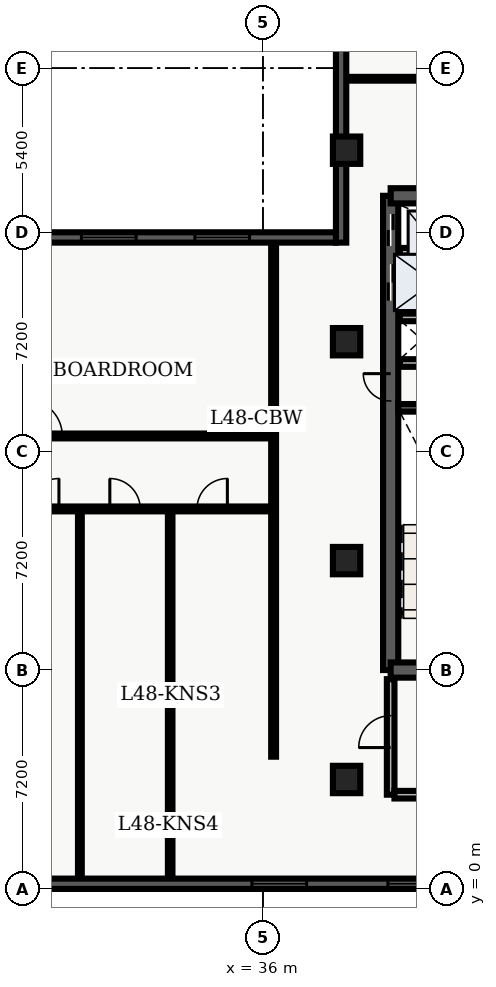
"""IFC4 building model, lengths in metres.
Left out: names, types, materials, properties, quantities, classifications, styles, units other than length and angle.
Written with IfcOpenShell. Run it as: python <this file> out.ifc"""

import sys

from ifc_helpers import new_model, entity, si_unit, converted_unit, direction, frame, origin_with_axes, origin_2d_with_axis, place, context, subcontext, project, spatial, polyline, rectangle, outline, extrude, element, fill, save


model = new_model("IFC4")
c1 = context("Model", 3, precision=1e-05, world=origin_with_axes(), true_north=direction((0.0, 1.0)))
c2 = subcontext(c1, "Body", "Model", "MODEL_VIEW")
j1 = project(units=[si_unit("LENGTHUNIT", "METRE"), converted_unit("PLANEANGLEUNIT", "DEGREE", entity("IfcPlaneAngleMeasure", 0.017), si_unit("PLANEANGLEUNIT", "RADIAN"), dimensions=[0, 0, 0, 0, 0, 0, 0])], contexts=[c1])
p1 = place(None, origin_with_axes())
s1 = spatial("IfcSite", under=j1, at=p1, CompositionType="ELEMENT")
p2 = place(p1, origin_with_axes())
s2 = spatial("IfcBuilding", under=s1, at=p2, CompositionType="ELEMENT")
p3 = place(p2, frame((0.0, 0.0, 196.5), z_axis=(0.0, 0.0, 1.0), x_axis=(1.0, 0.0, 0.0)))
s3 = spatial("IfcBuildingStorey", under=s2, at=p3, CompositionType="ELEMENT", Elevation=196.5)
p4 = place(p3, frame((40.2, 7.2, 0.0), z_axis=(0.0, 0.0, 1.0), x_axis=(0.0, 1.0, 0.0)))
e1 = element("IfcWall", 1, at=p4, inside=s3, PredefinedType="SHEAR", context=c2, shape_type="SweptSolid", body=[
    extrude(outline(polyline([(0.0, -0.25), (15.6, -0.25), (15.6, 0.25), (0.0, 0.25), (0.0, -0.25)])), origin_with_axes(), (0.0, 0.0, 1.0), 3.66),
])
p5 = place(p4, frame((14.475, 0.0, 0.0), z_axis=(0.0, 0.0, 1.0), x_axis=(1.0, 0.0, 0.0)))
e2 = element("IfcOpeningElement", 2, at=p5, cuts=e1, PredefinedType="OPENING", context=c2, shape_type="SweptSolid", body=[
    extrude(rectangle(XDim=1.05, YDim=0.52, at=origin_2d_with_axis()), origin_with_axes(), (0.0, 0.0, 1.0), 2.15),
])
p6 = place(p4, frame((12.75, 0.0, 0.0), z_axis=(0.0, 0.0, 1.0), x_axis=(1.0, 0.0, 0.0)))
e3 = element("IfcOpeningElement", 3, at=p6, cuts=e1, PredefinedType="OPENING", context=c2, shape_type="SweptSolid", body=[
    extrude(rectangle(XDim=1.2, YDim=0.52, at=origin_2d_with_axis()), origin_with_axes(), (0.0, 0.0, 1.0), 2.15),
])
p7 = place(p4, frame((9.3, 0.0, 0.0), z_axis=(0.0, 0.0, 1.0), x_axis=(1.0, 0.0, 0.0)))
e4 = element("IfcOpeningElement", 4, at=p7, cuts=e1, PredefinedType="OPENING", context=c2, shape_type="SweptSolid", body=[
    extrude(rectangle(XDim=0.9, YDim=0.52, at=origin_2d_with_axis()), origin_with_axes(), (0.0, 0.0, 1.0), 2.15),
])
p8 = place(p3, frame((40.2, 7.2, 0.0), z_axis=(0.0, 0.0, 1.0), x_axis=(1.0, 0.0, 0.0)))
e5 = element("IfcWall", 5, at=p8, inside=s3, PredefinedType="SHEAR", context=c2, shape_type="SweptSolid", body=[
    extrude(outline(polyline([(0.0, -0.25), (7.85, -0.25), (7.85, 0.25), (0.0, 0.25), (0.0, -0.25)])), origin_with_axes(), (0.0, 0.0, 1.0), 3.66),
])
p9 = place(p8, frame((2.175, 0.0, 0.0), z_axis=(0.0, 0.0, 1.0), x_axis=(1.0, 0.0, 0.0)))
e6 = element("IfcOpeningElement", 6, at=p9, cuts=e5, PredefinedType="OPENING", context=c2, shape_type="SweptSolid", body=[
    extrude(rectangle(XDim=1.05, YDim=0.52, at=origin_2d_with_axis()), origin_with_axes(), (0.0, 0.0, 1.0), 2.15),
])
p10 = place(p3, frame((40.2, 22.8, 0.0), z_axis=(0.0, 0.0, 1.0), x_axis=(1.0, 0.0, 0.0)))
e7 = element("IfcWall", 7, at=p10, inside=s3, PredefinedType="SHEAR", context=c2, shape_type="SweptSolid", body=[
    extrude(outline(polyline([(0.0, -0.25), (7.85, -0.25), (7.85, 0.25), (0.0, 0.25), (0.0, -0.25)])), origin_with_axes(), (0.0, 0.0, 1.0), 3.66),
])
p11 = place(p10, frame((5.775, 0.0, 0.0), z_axis=(0.0, 0.0, 1.0), x_axis=(1.0, 0.0, 0.0)))
e8 = element("IfcOpeningElement", 8, at=p11, cuts=e7, PredefinedType="OPENING", context=c2, shape_type="SweptSolid", body=[
    extrude(rectangle(XDim=1.05, YDim=0.52, at=origin_2d_with_axis()), origin_with_axes(), (0.0, 0.0, 1.0), 2.15),
])
p12 = place(p3, frame((40.45, 15.825, 0.0), z_axis=(0.0, 0.0, 1.0), x_axis=(1.0, 0.0, 0.0)))
e9 = element("IfcWall", 9, at=p12, inside=s3, PredefinedType="SHEAR", context=c2, shape_type="SweptSolid", body=[
    extrude(outline(polyline([(0.0, -0.125), (3.55, -0.125), (3.55, 0.125), (0.0, 0.125), (0.0, -0.125)])), origin_with_axes(), (0.0, 0.0, 1.0), 3.66),
])
p13 = place(p3, frame((40.5, 17.3, 0.0), z_axis=(0.0, 0.0, 1.0), x_axis=(1.0, 0.0, 0.0)))
e10 = element("IfcWall", 10, at=p13, inside=s3, PredefinedType="SOLIDWALL", context=c2, shape_type="SweptSolid", body=[
    extrude(outline(polyline([(0.0, -0.125), (3.5, -0.125), (3.5, 0.125), (0.0, 0.125), (0.0, -0.125)])), origin_with_axes(), (0.0, 0.0, 1.0), 2.7),
])
p14 = place(p13, frame((2.4, 0.0, 0.0), z_axis=(0.0, 0.0, 1.0), x_axis=(1.0, 0.0, 0.0)))
e11 = element("IfcOpeningElement", 11, at=p14, cuts=e10, PredefinedType="OPENING", context=c2, shape_type="SweptSolid", body=[
    extrude(rectangle(XDim=0.9, YDim=0.27, at=origin_2d_with_axis()), origin_with_axes(), (0.0, 0.0, 1.0), 2.15),
])
p15 = place(p3, frame((40.5, 18.8, 0.0), z_axis=(0.0, 0.0, 1.0), x_axis=(1.0, 0.0, 0.0)))
e12 = element("IfcWall", 12, at=p15, inside=s3, PredefinedType="SOLIDWALL", context=c2, shape_type="SweptSolid", body=[
    extrude(outline(polyline([(0.0, -0.125), (3.5, -0.125), (3.5, 0.125), (0.0, 0.125), (0.0, -0.125)])), origin_with_axes(), (0.0, 0.0, 1.0), 2.7),
])
p16 = place(p3, frame((40.2, 3.1, 0.0), z_axis=(0.0, 0.0, 1.0), x_axis=(0.0, 1.0, 0.0)))
e13 = element("IfcWall", 13, at=p16, inside=s3, PredefinedType="SOLIDWALL", context=c2, shape_type="SweptSolid", body=[
    extrude(outline(polyline([(0.0, -0.125), (3.8, -0.125), (3.8, 0.125), (0.0, 0.125), (0.0, -0.125)])), origin_with_axes(), (0.0, 0.0, 1.0), 2.7),
])
p17 = place(p16, frame((2.075, 0.0, 0.0), z_axis=(0.0, 0.0, 1.0), x_axis=(1.0, 0.0, 0.0)))
e14 = element("IfcOpeningElement", 14, at=p17, cuts=e13, PredefinedType="OPENING", context=c2, shape_type="SweptSolid", body=[
    extrude(rectangle(XDim=1.05, YDim=0.27, at=origin_2d_with_axis()), origin_with_axes(), (0.0, 0.0, 1.0), 2.15),
])
p18 = place(p3, frame((40.325, 3.1, 0.0), z_axis=(0.0, 0.0, 1.0), x_axis=(1.0, 0.0, 0.0)))
e15 = element("IfcWall", 15, at=p18, inside=s3, PredefinedType="SOLIDWALL", context=c2, shape_type="SweptSolid", body=[
    extrude(outline(polyline([(0.0, -0.125), (3.95, -0.125), (3.95, 0.125), (0.0, 0.125), (0.0, -0.125)])), origin_with_axes(), (0.0, 0.0, 1.0), 2.7),
])
for number, where, z_axis, x_axis in (
    (16, (38.75, 3.6, 0.0), (0.0, 0.0, 1.0), (1.0, 0.0, 0.0)),
    (17, (38.75, 10.8, 0.0), (0.0, 0.0, 1.0), (1.0, 0.0, 0.0)),
    (18, (38.75, 18.0, 0.0), (0.0, 0.0, 1.0), (1.0, 0.0, 0.0)),
    (19, (38.75, 24.3, 0.0), (0.0, 0.0, 1.0), (1.0, 0.0, 0.0)),
):
    element("IfcColumn", number, at=place(p3, frame(where, z_axis=z_axis, x_axis=x_axis)), inside=s3, PredefinedType="COLUMN", context=c2, shape_type="SweptSolid", body=[
        extrude(rectangle(XDim=0.9, YDim=0.9, at=origin_2d_with_axis()), origin_with_axes(), (0.0, 0.0, 1.0), 3.9),
    ])
p19 = place(p3, frame((40.5, 20.96, 0.0), z_axis=(0.0, 0.0, 1.0), x_axis=(1.0, 0.0, 0.0)))
e20 = element("IfcWall", 20, at=p19, inside=s3, PredefinedType="SOLIDWALL", context=c2, shape_type="SweptSolid", body=[
    extrude(outline(polyline([(0.0, -0.125), (3.5, -0.125), (3.5, 0.125), (0.0, 0.125), (0.0, -0.125)])), origin_with_axes(), (0.0, 0.0, 1.0), 2.7),
])
p20 = place(p3, frame((21.15, 12.5, 0.0), z_axis=(0.0, 0.0, 1.0), x_axis=(1.0, 0.0, 0.0)))
e21 = element("IfcWall", 21, at=p20, inside=s3, PredefinedType="PARTITIONING", context=c2, shape_type="SweptSolid", body=[
    extrude(outline(polyline([(0.0, -0.08), (15.2, -0.08), (15.2, 0.08), (0.0, 0.08), (0.0, -0.08)])), origin_with_axes(), (0.0, 0.0, 1.0), 2.7),
])
p21 = place(p20, frame((3.315, 0.0, 0.0), z_axis=(0.0, 0.0, 1.0), x_axis=(1.0, 0.0, 0.0)))
e22 = element("IfcOpeningElement", 22, at=p21, cuts=e21, PredefinedType="OPENING", context=c2, shape_type="SweptSolid", body=[
    extrude(rectangle(XDim=1.0, YDim=0.18, at=origin_2d_with_axis()), origin_with_axes(), (0.0, 0.0, 1.0), 2.15),
])
p22 = place(p20, frame((7.639, 0.0, 0.0), z_axis=(0.0, 0.0, 1.0), x_axis=(1.0, 0.0, 0.0)))
e23 = element("IfcOpeningElement", 23, at=p22, cuts=e21, PredefinedType="OPENING", context=c2, shape_type="SweptSolid", body=[
    extrude(rectangle(XDim=1.0, YDim=0.18, at=origin_2d_with_axis()), origin_with_axes(), (0.0, 0.0, 1.0), 2.15),
])
p23 = place(p20, frame((10.313, 0.0, 0.0), z_axis=(0.0, 0.0, 1.0), x_axis=(1.0, 0.0, 0.0)))
e24 = element("IfcOpeningElement", 24, at=p23, cuts=e21, PredefinedType="OPENING", context=c2, shape_type="SweptSolid", body=[
    extrude(rectangle(XDim=1.0, YDim=0.18, at=origin_2d_with_axis()), origin_with_axes(), (0.0, 0.0, 1.0), 2.15),
])
p24 = place(p20, frame((13.179, 0.0, 0.0), z_axis=(0.0, 0.0, 1.0), x_axis=(1.0, 0.0, 0.0)))
e25 = element("IfcOpeningElement", 25, at=p24, cuts=e21, PredefinedType="OPENING", context=c2, shape_type="SweptSolid", body=[
    extrude(rectangle(XDim=1.0, YDim=0.18, at=origin_2d_with_axis()), origin_with_axes(), (0.0, 0.0, 1.0), 2.15),
])
p25 = place(p3, frame((21.15, 14.9, 0.0), z_axis=(0.0, 0.0, 1.0), x_axis=(1.0, 0.0, 0.0)))
e26 = element("IfcWall", 26, at=p25, inside=s3, PredefinedType="PARTITIONING", context=c2, shape_type="SweptSolid", body=[
    extrude(outline(polyline([(0.0, -0.08), (15.2, -0.08), (15.2, 0.08), (0.0, 0.08), (0.0, -0.08)])), origin_with_axes(), (0.0, 0.0, 1.0), 2.7),
])
p26 = place(p25, frame((7.65, 0.0, 0.0), z_axis=(0.0, 0.0, 1.0), x_axis=(1.0, 0.0, 0.0)))
e27 = element("IfcOpeningElement", 27, at=p26, cuts=e26, PredefinedType="OPENING", context=c2, shape_type="SweptSolid", body=[
    extrude(rectangle(XDim=1.2, YDim=0.18, at=origin_2d_with_axis()), origin_with_axes(), (0.0, 0.0, 1.0), 2.2),
])
p27 = place(p3, frame((36.35, 4.35, 0.0), z_axis=(0.0, 0.0, 1.0), x_axis=(0.0, 1.0, 0.0)))
e28 = element("IfcWall", 28, at=p27, inside=s3, PredefinedType="PARTITIONING", context=c2, shape_type="SweptSolid", body=[
    extrude(outline(polyline([(0.0, -0.08), (16.95, -0.08), (16.95, 0.08), (0.0, 0.08), (0.0, -0.08)])), origin_with_axes(), (0.0, 0.0, 1.0), 2.7),
])
p28 = place(p3, frame((29.978, 0.335, 0.0), z_axis=(0.0, 0.0, 1.0), x_axis=(0.0, 1.0, 0.0)))
e29 = element("IfcWall", 29, at=p28, inside=s3, PredefinedType="PARTITIONING", context=c2, shape_type="SweptSolid", body=[
    extrude(outline(polyline([(0.0, -0.062), (12.045, -0.062), (12.045, 0.062), (0.0, 0.062), (0.0, -0.062)])), origin_with_axes(), (0.0, 0.0, 1.0), 2.7),
])
p29 = place(p3, frame((32.948, 0.335, 0.0), z_axis=(0.0, 0.0, 1.0), x_axis=(0.0, 1.0, 0.0)))
e30 = element("IfcWall", 30, at=p29, inside=s3, PredefinedType="PARTITIONING", context=c2, shape_type="SweptSolid", body=[
    extrude(outline(polyline([(0.0, -0.075), (12.045, -0.075), (12.045, 0.075), (0.0, 0.075), (0.0, -0.075)])), origin_with_axes(), (0.0, 0.0, 1.0), 2.7),
])
p30 = place(p3, frame((38.735, 26.65, 0.0), z_axis=(0.0, 0.0, 1.0), x_axis=(1.0, 0.0, 0.0)))
e31 = element("IfcWall", 31, at=p30, inside=s3, PredefinedType="PARTITIONING", context=c2, shape_type="SweptSolid", body=[
    extrude(outline(polyline([(0.0, -0.062), (20.905, -0.062), (20.905, 0.062), (0.0, 0.062), (0.0, -0.062)])), origin_with_axes(), (0.0, 0.0, 1.0), 2.7),
])
p31 = place(p30, frame((4.265, 0.0, 0.0), z_axis=(0.0, 0.0, 1.0), x_axis=(1.0, 0.0, 0.0)))
e32 = element("IfcOpeningElement", 32, at=p31, cuts=e31, PredefinedType="OPENING", context=c2, shape_type="SweptSolid", body=[
    extrude(rectangle(XDim=1.0, YDim=0.145, at=origin_2d_with_axis()), origin_with_axes(), (0.0, 0.0, 1.0), 2.15),
])
p32 = place(p3, frame((38.57, 21.26, 0.0), z_axis=(0.0, 0.0, 1.0), x_axis=(0.0, 1.0, 0.0)))
e33 = element("IfcWall", 33, at=p32, inside=s3, PredefinedType="SOLIDWALL", context=c2, shape_type="SweptSolid", body=[
    extrude(outline(polyline([(0.0, -0.17), (7.54, -0.17), (7.54, 0.17), (0.0, 0.17), (0.0, -0.17)])), origin_with_axes(), (0.0, 0.0, 1.0), 3.66),
])
p33 = place(p3, frame((57.26, 0.17, 0.0), z_axis=(0.0, 0.0, 1.0), x_axis=(-1.0, 0.0, 0.0)))
e34 = element("IfcWall", 34, at=p33, inside=s3, PredefinedType="SOLIDWALL", context=c2, shape_type="SweptSolid", body=[
    extrude(outline(polyline([(0.0, -0.17), (54.86, -0.17), (54.86, 0.17), (0.0, 0.17), (0.0, -0.17)])), origin_with_axes(), (0.0, 0.0, 1.0), 3.66),
])
p34 = place(p33, frame((2.836, 0.0, 0.45), z_axis=(0.0, 0.0, 1.0), x_axis=(1.0, 0.0, 0.0)))
e35 = element("IfcOpeningElement", 35, at=p34, cuts=e34, PredefinedType="OPENING", context=c2, shape_type="SweptSolid", body=[
    extrude(rectangle(XDim=1.8, YDim=0.36, at=origin_2d_with_axis()), origin_with_axes(), (0.0, 0.0, 1.0), 2.1),
])
p35 = place(p33, frame((7.307, 0.0, 0.45), z_axis=(0.0, 0.0, 1.0), x_axis=(1.0, 0.0, 0.0)))
e36 = element("IfcOpeningElement", 36, at=p35, cuts=e34, PredefinedType="OPENING", context=c2, shape_type="SweptSolid", body=[
    extrude(rectangle(XDim=1.8, YDim=0.36, at=origin_2d_with_axis()), origin_with_axes(), (0.0, 0.0, 1.0), 2.1),
])
p36 = place(p33, frame((11.779, 0.0, 0.45), z_axis=(0.0, 0.0, 1.0), x_axis=(1.0, 0.0, 0.0)))
e37 = element("IfcOpeningElement", 37, at=p36, cuts=e34, PredefinedType="OPENING", context=c2, shape_type="SweptSolid", body=[
    extrude(rectangle(XDim=1.8, YDim=0.36, at=origin_2d_with_axis()), origin_with_axes(), (0.0, 0.0, 1.0), 2.1),
])
p37 = place(p33, frame((16.251, 0.0, 0.45), z_axis=(0.0, 0.0, 1.0), x_axis=(1.0, 0.0, 0.0)))
e38 = element("IfcOpeningElement", 38, at=p37, cuts=e34, PredefinedType="OPENING", context=c2, shape_type="SweptSolid", body=[
    extrude(rectangle(XDim=1.8, YDim=0.36, at=origin_2d_with_axis()), origin_with_axes(), (0.0, 0.0, 1.0), 2.1),
])
p38 = place(p33, frame((20.723, 0.0, 0.45), z_axis=(0.0, 0.0, 1.0), x_axis=(1.0, 0.0, 0.0)))
e39 = element("IfcOpeningElement", 39, at=p38, cuts=e34, PredefinedType="OPENING", context=c2, shape_type="SweptSolid", body=[
    extrude(rectangle(XDim=1.8, YDim=0.36, at=origin_2d_with_axis()), origin_with_axes(), (0.0, 0.0, 1.0), 2.1),
])
p39 = place(p33, frame((34.138, 0.0, 0.45), z_axis=(0.0, 0.0, 1.0), x_axis=(1.0, 0.0, 0.0)))
e40 = element("IfcOpeningElement", 40, at=p39, cuts=e34, PredefinedType="OPENING", context=c2, shape_type="SweptSolid", body=[
    extrude(rectangle(XDim=1.8, YDim=0.36, at=origin_2d_with_axis()), origin_with_axes(), (0.0, 0.0, 1.0), 2.1),
])
p40 = place(p33, frame((38.609, 0.0, 0.45), z_axis=(0.0, 0.0, 1.0), x_axis=(1.0, 0.0, 0.0)))
e41 = element("IfcOpeningElement", 41, at=p40, cuts=e34, PredefinedType="OPENING", context=c2, shape_type="SweptSolid", body=[
    extrude(rectangle(XDim=1.8, YDim=0.36, at=origin_2d_with_axis()), origin_with_axes(), (0.0, 0.0, 1.0), 2.1),
])
p41 = place(p33, frame((43.531, 0.0, 0.45), z_axis=(0.0, 0.0, 1.0), x_axis=(1.0, 0.0, 0.0)))
e42 = element("IfcOpeningElement", 42, at=p41, cuts=e34, PredefinedType="OPENING", context=c2, shape_type="SweptSolid", body=[
    extrude(rectangle(XDim=1.8, YDim=0.36, at=origin_2d_with_axis()), origin_with_axes(), (0.0, 0.0, 1.0), 2.1),
])
p42 = place(p33, frame((47.553, 0.0, 0.45), z_axis=(0.0, 0.0, 1.0), x_axis=(1.0, 0.0, 0.0)))
e43 = element("IfcOpeningElement", 43, at=p42, cuts=e34, PredefinedType="OPENING", context=c2, shape_type="SweptSolid", body=[
    extrude(rectangle(XDim=1.8, YDim=0.36, at=origin_2d_with_axis()), origin_with_axes(), (0.0, 0.0, 1.0), 2.1),
])
p43 = place(p33, frame((52.024, 0.0, 0.45), z_axis=(0.0, 0.0, 1.0), x_axis=(1.0, 0.0, 0.0)))
e44 = element("IfcOpeningElement", 44, at=p43, cuts=e34, PredefinedType="OPENING", context=c2, shape_type="SweptSolid", body=[
    extrude(rectangle(XDim=1.8, YDim=0.36, at=origin_2d_with_axis()), origin_with_axes(), (0.0, 0.0, 1.0), 2.1),
])
p44 = place(p3, frame((28.039, 21.43, 0.0), z_axis=(0.0, 0.0, 1.0), x_axis=(1.0, 0.0, 0.0)))
e45 = element("IfcWall", 45, at=p44, inside=s3, PredefinedType="SOLIDWALL", context=c2, shape_type="SweptSolid", body=[
    extrude(outline(polyline([(0.0, -0.17), (10.361, -0.17), (10.361, 0.17), (0.0, 0.17), (0.0, -0.17)])), origin_with_axes(), (0.0, 0.0, 1.0), 3.66),
])
p45 = place(p44, frame((2.89, 0.0, 0.45), z_axis=(0.0, 0.0, 1.0), x_axis=(1.0, 0.0, 0.0)))
e46 = element("IfcOpeningElement", 46, at=p45, cuts=e45, PredefinedType="OPENING", context=c2, shape_type="SweptSolid", body=[
    extrude(rectangle(XDim=1.8, YDim=0.36, at=origin_2d_with_axis()), origin_with_axes(), (0.0, 0.0, 1.0), 2.1),
])
p46 = place(p44, frame((6.621, 0.0, 0.45), z_axis=(0.0, 0.0, 1.0), x_axis=(1.0, 0.0, 0.0)))
e47 = element("IfcOpeningElement", 47, at=p46, cuts=e45, PredefinedType="OPENING", context=c2, shape_type="SweptSolid", body=[
    extrude(rectangle(XDim=1.8, YDim=0.36, at=origin_2d_with_axis()), origin_with_axes(), (0.0, 0.0, 1.0), 2.1),
])
p47 = place(p4, frame((14.475, 0.0, 0.0), z_axis=(0.0, 0.0, 1.0), x_axis=(1.0, 0.0, 0.0)))
e48 = element("IfcDoor", 48, at=p47, inside=s3, OperationType="SLIDING_TO_RIGHT", PredefinedType="DOOR", context=c2, shape_type="SweptSolid", body=[
    extrude(rectangle(XDim=1.05, YDim=0.09, at=origin_2d_with_axis()), origin_with_axes(), (0.0, 0.0, 1.0), 2.15),
])
fill(e2, e48)
p48 = place(p4, frame((12.75, 0.0, 0.0), z_axis=(0.0, 0.0, 1.0), x_axis=(1.0, 0.0, 0.0)))
e49 = element("IfcDoor", 49, at=p48, inside=s3, OperationType="DOUBLE_DOOR_SLIDING", PredefinedType="DOOR", context=c2, shape_type="SweptSolid", body=[
    extrude(rectangle(XDim=1.2, YDim=0.09, at=origin_2d_with_axis()), origin_with_axes(), (0.0, 0.0, 1.0), 2.15),
])
fill(e3, e49)
p49 = place(p4, frame((9.3, 0.0, 0.0), z_axis=(0.0, 0.0, 1.0), x_axis=(1.0, 0.0, 0.0)))
e50 = element("IfcDoor", 50, at=p49, inside=s3, OperationType="SINGLE_SWING_RIGHT", PredefinedType="DOOR", context=c2, shape_type="SweptSolid", body=[
    extrude(rectangle(XDim=0.9, YDim=0.09, at=origin_2d_with_axis()), origin_with_axes(), (0.0, 0.0, 1.0), 2.15),
])
fill(e4, e50)
p50 = place(p16, frame((2.075, 0.0, 0.0), z_axis=(0.0, 0.0, 1.0), x_axis=(1.0, 0.0, 0.0)))
e51 = element("IfcDoor", 51, at=p50, inside=s3, OperationType="SINGLE_SWING_LEFT", PredefinedType="DOOR", context=c2, shape_type="SweptSolid", body=[
    extrude(rectangle(XDim=1.05, YDim=0.09, at=origin_2d_with_axis()), origin_with_axes(), (0.0, 0.0, 1.0), 2.15),
])
fill(e14, e51)
p51 = place(p20, frame((7.639, 0.0, 0.0), z_axis=(0.0, 0.0, 1.0), x_axis=(1.0, 0.0, 0.0)))
e52 = element("IfcDoor", 52, at=p51, inside=s3, OperationType="SINGLE_SWING_RIGHT", PredefinedType="DOOR", context=c2, shape_type="SweptSolid", body=[
    extrude(rectangle(XDim=1.0, YDim=0.09, at=origin_2d_with_axis()), origin_with_axes(), (0.0, 0.0, 1.0), 2.15),
])
fill(e23, e52)
p52 = place(p20, frame((10.313, 0.0, 0.0), z_axis=(0.0, 0.0, 1.0), x_axis=(1.0, 0.0, 0.0)))
e53 = element("IfcDoor", 53, at=p52, inside=s3, OperationType="SINGLE_SWING_LEFT", PredefinedType="DOOR", context=c2, shape_type="SweptSolid", body=[
    extrude(rectangle(XDim=1.0, YDim=0.09, at=origin_2d_with_axis()), origin_with_axes(), (0.0, 0.0, 1.0), 2.15),
])
fill(e24, e53)
p53 = place(p20, frame((13.179, 0.0, 0.0), z_axis=(0.0, 0.0, 1.0), x_axis=(1.0, 0.0, 0.0)))
e54 = element("IfcDoor", 54, at=p53, inside=s3, OperationType="SINGLE_SWING_RIGHT", PredefinedType="DOOR", context=c2, shape_type="SweptSolid", body=[
    extrude(rectangle(XDim=1.0, YDim=0.09, at=origin_2d_with_axis()), origin_with_axes(), (0.0, 0.0, 1.0), 2.15),
])
fill(e25, e54)
p54 = place(p25, frame((7.65, 0.0, 0.0), z_axis=(0.0, 0.0, 1.0), x_axis=(1.0, 0.0, 0.0)))
e55 = element("IfcDoor", 55, at=p54, inside=s3, OperationType="SINGLE_SWING_LEFT", PredefinedType="DOOR", context=c2, shape_type="SweptSolid", body=[
    extrude(rectangle(XDim=1.2, YDim=0.09, at=origin_2d_with_axis()), origin_with_axes(), (0.0, 0.0, 1.0), 2.2),
])
fill(e27, e55)
p55 = place(p33, frame((16.251, 0.0, 0.45), z_axis=(0.0, 0.0, 1.0), x_axis=(1.0, 0.0, 0.0)))
e56 = element("IfcWindow", 56, at=p55, inside=s3, PredefinedType="WINDOW", context=c2, shape_type="SweptSolid", body=[
    extrude(rectangle(XDim=1.8, YDim=0.09, at=origin_2d_with_axis()), origin_with_axes(), (0.0, 0.0, 1.0), 2.1),
])
fill(e38, e56)
p56 = place(p33, frame((20.723, 0.0, 0.45), z_axis=(0.0, 0.0, 1.0), x_axis=(1.0, 0.0, 0.0)))
e57 = element("IfcWindow", 57, at=p56, inside=s3, PredefinedType="WINDOW", context=c2, shape_type="SweptSolid", body=[
    extrude(rectangle(XDim=1.8, YDim=0.09, at=origin_2d_with_axis()), origin_with_axes(), (0.0, 0.0, 1.0), 2.1),
])
fill(e39, e57)
p57 = place(p44, frame((2.89, 0.0, 0.45), z_axis=(0.0, 0.0, 1.0), x_axis=(1.0, 0.0, 0.0)))
e58 = element("IfcWindow", 58, at=p57, inside=s3, PredefinedType="WINDOW", context=c2, shape_type="SweptSolid", body=[
    extrude(rectangle(XDim=1.8, YDim=0.09, at=origin_2d_with_axis()), origin_with_axes(), (0.0, 0.0, 1.0), 2.1),
])
fill(e46, e58)
p58 = place(p44, frame((6.621, 0.0, 0.45), z_axis=(0.0, 0.0, 1.0), x_axis=(1.0, 0.0, 0.0)))
e59 = element("IfcWindow", 59, at=p58, inside=s3, PredefinedType="WINDOW", context=c2, shape_type="SweptSolid", body=[
    extrude(rectangle(XDim=1.8, YDim=0.09, at=origin_2d_with_axis()), origin_with_axes(), (0.0, 0.0, 1.0), 2.1),
])
fill(e47, e59)
save(model, sys.argv[1])
